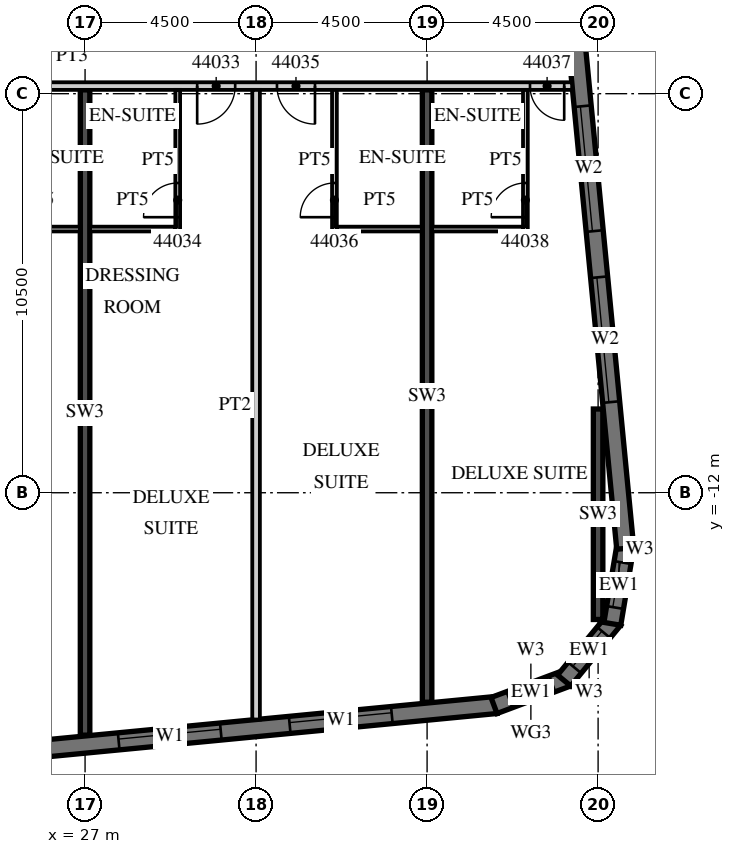
"""IFC4 building model, lengths in metres.
Left out: names, types, materials, properties, quantities, classifications, styles, units other than length and angle.
Written with IfcOpenShell. Run it as: python <this file> out.ifc"""

import sys

from ifc_helpers import new_model, si_unit, direction, frame, frame_2d, origin, place, context, subcontext, project, spatial, polyline, rectangle, outline, extrude, element, fill, save


model = new_model("IFC4")
c1 = context("Model", 3, precision=1e-05, world=origin(), true_north=direction((0.0, 1.0)))
c2 = subcontext(c1, "Body", "Model", "MODEL_VIEW")
j1 = project(units=[si_unit("LENGTHUNIT", "METRE"), si_unit("PLANEANGLEUNIT", "RADIAN")], contexts=[c1])
p1 = place(None, origin())
s1 = spatial("IfcSite", under=j1, at=p1, CompositionType="ELEMENT")
p2 = place(p1, origin())
s2 = spatial("IfcBuilding", under=s1, at=p2, CompositionType="ELEMENT")
p3 = place(p2, frame((0.0, 0.0, 186.7)))
s3 = spatial("IfcBuildingStorey", under=s2, at=p3, CompositionType="ELEMENT", Elevation=186.7)
p4 = place(p3, frame((27.0, -18.379, 0.0), z_axis=(0.0, 0.0, 1.0), x_axis=(0.0, 1.0, 0.0)))
e1 = element("IfcWall", 1, at=p4, inside=s3, PredefinedType="SHEAR", context=c2, shape_type="SweptSolid", body=[
    extrude(rectangle(XDim=16.979, YDim=0.25, at=frame_2d((8.489, 0.0))), origin(), (0.0, 0.0, 1.0), 3.3),
])
p5 = place(p3, frame((36.0, -17.512, 0.0), z_axis=(0.0, 0.0, 1.0), x_axis=(0.0, 1.0, 0.0)))
e2 = element("IfcWall", 2, at=p5, inside=s3, PredefinedType="SHEAR", context=c2, shape_type="SweptSolid", body=[
    extrude(rectangle(XDim=16.112, YDim=0.25, at=frame_2d((8.056, 0.0))), origin(), (0.0, 0.0, 1.0), 3.3),
])
p6 = place(p3, frame((40.5, -15.335, 0.0), z_axis=(0.0, 0.0, 1.0), x_axis=(0.0, 1.0, 0.0)))
e3 = element("IfcWall", 3, at=p6, inside=s3, PredefinedType="SHEAR", context=c2, shape_type="SweptSolid", body=[
    extrude(rectangle(XDim=5.538, YDim=0.25, at=frame_2d((2.769, 0.0))), origin(), (0.0, 0.0, 1.0), 3.3),
])
p7 = place(p3, frame((-13.521, -22.529, 0.0), z_axis=(0.0, 0.0, 1.0), x_axis=(0.995396436651, 0.095843277819, 0.0)))
e4 = element("IfcWall", 4, at=p7, inside=s3, PredefinedType="SOLIDWALL", context=c2, shape_type="SweptSolid", body=[
    extrude(rectangle(XDim=51.578, YDim=0.45, at=frame_2d((25.789, 0.0))), origin(), (0.0, 0.0, 1.0), 3.02),
])
p8 = place(p7, frame((0.91, 0.0, 0.45)))
e5 = element("IfcOpeningElement", 5, at=p8, cuts=e4, PredefinedType="OPENING", context=c2, shape_type="SweptSolid", body=[
    extrude(rectangle(XDim=2.7, YDim=2.25, at=frame_2d((1.35, 1.125))), frame((0.0, 0.235, 0.0), z_axis=(0.0, -1.0, 0.0), x_axis=(1.0, 0.0, 0.0)), (0.0, 0.0, 1.0), 0.47),
])
p9 = place(p7, frame((5.431, 0.0, 0.45)))
e6 = element("IfcOpeningElement", 6, at=p9, cuts=e4, PredefinedType="OPENING", context=c2, shape_type="SweptSolid", body=[
    extrude(rectangle(XDim=2.7, YDim=2.25, at=frame_2d((1.35, 1.125))), frame((0.0, 0.235, 0.0), z_axis=(0.0, -1.0, 0.0), x_axis=(1.0, 0.0, 0.0)), (0.0, 0.0, 1.0), 0.47),
])
p10 = place(p7, frame((9.952, 0.0, 0.45)))
e7 = element("IfcOpeningElement", 7, at=p10, cuts=e4, PredefinedType="OPENING", context=c2, shape_type="SweptSolid", body=[
    extrude(rectangle(XDim=2.7, YDim=2.25, at=frame_2d((1.35, 1.125))), frame((0.0, 0.235, 0.0), z_axis=(0.0, -1.0, 0.0), x_axis=(1.0, 0.0, 0.0)), (0.0, 0.0, 1.0), 0.47),
])
p11 = place(p7, frame((14.473, 0.0, 0.45)))
e8 = element("IfcOpeningElement", 8, at=p11, cuts=e4, PredefinedType="OPENING", context=c2, shape_type="SweptSolid", body=[
    extrude(rectangle(XDim=2.7, YDim=2.25, at=frame_2d((1.35, 1.125))), frame((0.0, 0.235, 0.0), z_axis=(0.0, -1.0, 0.0), x_axis=(1.0, 0.0, 0.0)), (0.0, 0.0, 1.0), 0.47),
])
p12 = place(p7, frame((18.994, 0.0, 0.45)))
e9 = element("IfcOpeningElement", 9, at=p12, cuts=e4, PredefinedType="OPENING", context=c2, shape_type="SweptSolid", body=[
    extrude(rectangle(XDim=2.7, YDim=2.25, at=frame_2d((1.35, 1.125))), frame((0.0, 0.235, 0.0), z_axis=(0.0, -1.0, 0.0), x_axis=(1.0, 0.0, 0.0)), (0.0, 0.0, 1.0), 0.47),
])
p13 = place(p7, frame((23.514, 0.0, 0.45)))
e10 = element("IfcOpeningElement", 10, at=p13, cuts=e4, PredefinedType="OPENING", context=c2, shape_type="SweptSolid", body=[
    extrude(rectangle(XDim=2.7, YDim=2.25, at=frame_2d((1.35, 1.125))), frame((0.0, 0.235, 0.0), z_axis=(0.0, -1.0, 0.0), x_axis=(1.0, 0.0, 0.0)), (0.0, 0.0, 1.0), 0.47),
])
p14 = place(p7, frame((28.035, 0.0, 0.45)))
e11 = element("IfcOpeningElement", 11, at=p14, cuts=e4, PredefinedType="OPENING", context=c2, shape_type="SweptSolid", body=[
    extrude(rectangle(XDim=2.7, YDim=2.25, at=frame_2d((1.35, 1.125))), frame((0.0, 0.235, 0.0), z_axis=(0.0, -1.0, 0.0), x_axis=(1.0, 0.0, 0.0)), (0.0, 0.0, 1.0), 0.47),
])
p15 = place(p7, frame((32.556, 0.0, 0.45)))
e12 = element("IfcOpeningElement", 12, at=p15, cuts=e4, PredefinedType="OPENING", context=c2, shape_type="SweptSolid", body=[
    extrude(rectangle(XDim=2.7, YDim=2.25, at=frame_2d((1.35, 1.125))), frame((0.0, 0.235, 0.0), z_axis=(0.0, -1.0, 0.0), x_axis=(1.0, 0.0, 0.0)), (0.0, 0.0, 1.0), 0.47),
])
p16 = place(p7, frame((37.077, 0.0, 0.45)))
e13 = element("IfcOpeningElement", 13, at=p16, cuts=e4, PredefinedType="OPENING", context=c2, shape_type="SweptSolid", body=[
    extrude(rectangle(XDim=2.7, YDim=2.25, at=frame_2d((1.35, 1.125))), frame((0.0, 0.235, 0.0), z_axis=(0.0, -1.0, 0.0), x_axis=(1.0, 0.0, 0.0)), (0.0, 0.0, 1.0), 0.47),
])
p17 = place(p7, frame((41.598, 0.0, 0.45)))
e14 = element("IfcOpeningElement", 14, at=p17, cuts=e4, PredefinedType="OPENING", context=c2, shape_type="SweptSolid", body=[
    extrude(rectangle(XDim=2.7, YDim=2.25, at=frame_2d((1.35, 1.125))), frame((0.0, 0.235, 0.0), z_axis=(0.0, -1.0, 0.0), x_axis=(1.0, 0.0, 0.0)), (0.0, 0.0, 1.0), 0.47),
])
p18 = place(p7, frame((46.119, 0.0, 0.45)))
e15 = element("IfcOpeningElement", 15, at=p18, cuts=e4, PredefinedType="OPENING", context=c2, shape_type="SweptSolid", body=[
    extrude(rectangle(XDim=2.7, YDim=2.25, at=frame_2d((1.35, 1.125))), frame((0.0, 0.235, 0.0), z_axis=(0.0, -1.0, 0.0), x_axis=(1.0, 0.0, 0.0)), (0.0, 0.0, 1.0), 0.47),
])
p19 = place(p3, frame((37.761, -17.598, 0.0), z_axis=(0.0, 0.0, 1.0), x_axis=(0.936677599948, 0.350192909346, 0.0)))
e16 = element("IfcWall", 16, at=p19, inside=s3, PredefinedType="SOLIDWALL", context=c2, shape_type="SweptSolid", body=[
    extrude(outline(polyline([(0.0, -0.225), (2.071, -0.225), (1.95, 0.225), (0.121, 0.225), (0.0, -0.225)])), origin(), (0.0, 0.0, 1.0), 3.02),
])
p20 = place(p19, frame((0.435, 0.0, 0.45)))
e17 = element("IfcOpeningElement", 17, at=p20, cuts=e16, PredefinedType="OPENING", context=c2, shape_type="SweptSolid", body=[
    extrude(rectangle(XDim=1.2, YDim=2.25, at=frame_2d((0.6, 1.125))), frame((0.0, 0.235, 0.0), z_axis=(0.0, -1.0, 0.0), x_axis=(1.0, 0.0, 0.0)), (0.0, 0.0, 1.0), 0.47),
])
p21 = place(p3, frame((39.606, -16.941, 0.0), z_axis=(0.0, 0.0, 1.0), x_axis=(0.636116318187, 0.771593176315, 0.0)))
e18 = element("IfcWall", 18, at=p21, inside=s3, PredefinedType="SOLIDWALL", context=c2, shape_type="SweptSolid", body=[
    extrude(outline(polyline([(0.0, -0.225), (2.071, -0.225), (1.95, 0.225), (0.121, 0.225), (0.0, -0.225)])), origin(), (0.0, 0.0, 1.0), 3.02),
])
p22 = place(p21, frame((0.435, 0.0, 0.45)))
e19 = element("IfcOpeningElement", 19, at=p22, cuts=e18, PredefinedType="OPENING", context=c2, shape_type="SweptSolid", body=[
    extrude(rectangle(XDim=1.2, YDim=2.25, at=frame_2d((0.6, 1.125))), frame((0.0, 0.235, 0.0), z_axis=(0.0, -1.0, 0.0), x_axis=(1.0, 0.0, 0.0)), (0.0, 0.0, 1.0), 0.47),
])
p23 = place(p3, frame((40.875, -15.449, 0.0), z_axis=(0.0, 0.0, 1.0), x_axis=(0.164953448126, 0.986301353518, 0.0)))
e20 = element("IfcWall", 20, at=p23, inside=s3, PredefinedType="SOLIDWALL", context=c2, shape_type="SweptSolid", body=[
    extrude(outline(polyline([(0.0, -0.225), (2.071, -0.225), (1.95, 0.225), (0.121, 0.225), (0.0, -0.225)])), origin(), (0.0, 0.0, 1.0), 3.02),
])
p24 = place(p23, frame((0.435, 0.0, 0.45)))
e21 = element("IfcOpeningElement", 21, at=p24, cuts=e20, PredefinedType="OPENING", context=c2, shape_type="SweptSolid", body=[
    extrude(rectangle(XDim=1.2, YDim=2.25, at=frame_2d((0.6, 1.125))), frame((0.0, 0.235, 0.0), z_axis=(0.0, -1.0, 0.0), x_axis=(1.0, 0.0, 0.0)), (0.0, 0.0, 1.0), 0.47),
])
p25 = place(p3, frame((41.214, -13.466, 0.0), z_axis=(0.0, 0.0, 1.0), x_axis=(-0.095847314626, 0.995396047952, 0.0)))
e22 = element("IfcWall", 22, at=p25, inside=s3, PredefinedType="SOLIDWALL", context=c2, shape_type="SweptSolid", body=[
    extrude(rectangle(XDim=34.0, YDim=0.45, at=frame_2d((17.0, 0.0))), origin(), (0.0, 0.0, 1.0), 3.02),
])
p26 = place(p25, frame((3.869, 0.0, 0.45)))
e23 = element("IfcOpeningElement", 23, at=p26, cuts=e22, PredefinedType="OPENING", context=c2, shape_type="SweptSolid", body=[
    extrude(rectangle(XDim=3.3, YDim=2.25, at=frame_2d((1.65, 1.125))), frame((0.0, 0.235, 0.0), z_axis=(0.0, -1.0, 0.0), x_axis=(1.0, 0.0, 0.0)), (0.0, 0.0, 1.0), 0.47),
])
p27 = place(p25, frame((8.39, 0.0, 0.45)))
e24 = element("IfcOpeningElement", 24, at=p27, cuts=e22, PredefinedType="OPENING", context=c2, shape_type="SweptSolid", body=[
    extrude(rectangle(XDim=3.3, YDim=2.25, at=frame_2d((1.65, 1.125))), frame((0.0, 0.235, 0.0), z_axis=(0.0, -1.0, 0.0), x_axis=(1.0, 0.0, 0.0)), (0.0, 0.0, 1.0), 0.47),
])
p28 = place(p3, frame((13.5, -1.3, 0.0), z_axis=(0.0, 0.0, 1.0), x_axis=(1.0, 0.0, 0.0)))
e25 = element("IfcWall", 25, at=p28, inside=s3, PredefinedType="PARTITIONING", context=c2, shape_type="SweptSolid", body=[
    extrude(rectangle(XDim=26.317, YDim=0.2, at=frame_2d((13.158, 0.0))), origin(), (0.0, 0.0, 1.0), 3.02),
])
p29 = place(p28, frame((0.575, 0.0, 0.0)))
e26 = element("IfcOpeningElement", 26, at=p29, cuts=e25, PredefinedType="OPENING", context=c2, shape_type="SweptSolid", body=[
    extrude(rectangle(XDim=1.0, YDim=2.1, at=frame_2d((0.5, 1.05))), frame((0.0, 0.11, 0.0), z_axis=(0.0, -1.0, 0.0), x_axis=(1.0, 0.0, 0.0)), (0.0, 0.0, 1.0), 0.22),
])
p30 = place(p28, frame((5.075, 0.0, 0.0)))
e27 = element("IfcOpeningElement", 27, at=p30, cuts=e25, PredefinedType="OPENING", context=c2, shape_type="SweptSolid", body=[
    extrude(rectangle(XDim=1.0, YDim=2.1, at=frame_2d((0.5, 1.05))), frame((0.0, 0.11, 0.0), z_axis=(0.0, -1.0, 0.0), x_axis=(1.0, 0.0, 0.0)), (0.0, 0.0, 1.0), 0.22),
])
p31 = place(p28, frame((9.55, 0.0, 0.0)))
e28 = element("IfcOpeningElement", 28, at=p31, cuts=e25, PredefinedType="OPENING", context=c2, shape_type="SweptSolid", body=[
    extrude(rectangle(XDim=1.0, YDim=2.1, at=frame_2d((0.5, 1.05))), frame((0.0, 0.11, 0.0), z_axis=(0.0, -1.0, 0.0), x_axis=(1.0, 0.0, 0.0)), (0.0, 0.0, 1.0), 0.22),
])
p32 = place(p28, frame((16.45, 0.0, 0.0)))
e29 = element("IfcOpeningElement", 29, at=p32, cuts=e25, PredefinedType="OPENING", context=c2, shape_type="SweptSolid", body=[
    extrude(rectangle(XDim=1.0, YDim=2.1, at=frame_2d((0.5, 1.05))), frame((0.0, 0.11, 0.0), z_axis=(0.0, -1.0, 0.0), x_axis=(1.0, 0.0, 0.0)), (0.0, 0.0, 1.0), 0.22),
])
p33 = place(p28, frame((18.55, 0.0, 0.0)))
e30 = element("IfcOpeningElement", 30, at=p33, cuts=e25, PredefinedType="OPENING", context=c2, shape_type="SweptSolid", body=[
    extrude(rectangle(XDim=1.0, YDim=2.1, at=frame_2d((0.5, 1.05))), frame((0.0, 0.11, 0.0), z_axis=(0.0, -1.0, 0.0), x_axis=(1.0, 0.0, 0.0)), (0.0, 0.0, 1.0), 0.22),
])
p34 = place(p28, frame((25.208, 0.0, 0.0)))
e31 = element("IfcOpeningElement", 31, at=p34, cuts=e25, PredefinedType="OPENING", context=c2, shape_type="SweptSolid", body=[
    extrude(rectangle(XDim=0.9, YDim=2.1, at=frame_2d((0.45, 1.05))), frame((0.0, 0.11, 0.0), z_axis=(0.0, -1.0, 0.0), x_axis=(1.0, 0.0, 0.0)), (0.0, 0.0, 1.0), 0.22),
])
p35 = place(p3, frame((24.625, -5.062, 0.0), z_axis=(0.0, 0.0, 1.0), x_axis=(1.0, 0.0, 0.0)))
e32 = element("IfcWall", 32, at=p35, inside=s3, PredefinedType="PARTITIONING", context=c2, shape_type="SweptSolid", body=[
    extrude(rectangle(XDim=2.25, YDim=0.125, at=frame_2d((1.125, 0.0))), origin(), (0.0, 0.0, 1.0), 3.02),
])
p36 = place(p3, frame((31.5, -17.967, 0.0), z_axis=(0.0, 0.0, 1.0), x_axis=(0.0, 1.0, 0.0)))
e33 = element("IfcWall", 33, at=p36, inside=s3, PredefinedType="PARTITIONING", context=c2, shape_type="SweptSolid", body=[
    extrude(rectangle(XDim=16.567, YDim=0.2, at=frame_2d((8.284, 0.0))), origin(), (0.0, 0.0, 1.0), 3.02),
])
p37 = place(p3, frame((29.438, -5.125, 0.0), z_axis=(0.0, 0.0, 1.0), x_axis=(0.0, 1.0, 0.0)))
e34 = element("IfcWall", 34, at=p37, inside=s3, PredefinedType="PARTITIONING", context=c2, shape_type="SweptSolid", body=[
    extrude(rectangle(XDim=3.725, YDim=0.125, at=frame_2d((1.863, 0.0))), origin(), (0.0, 0.0, 1.0), 3.02),
])
p38 = place(p37, frame((0.375, 0.0, 0.0)))
e35 = element("IfcOpeningElement", 35, at=p38, cuts=e34, PredefinedType="OPENING", context=c2, shape_type="SweptSolid", body=[
    extrude(rectangle(XDim=0.9, YDim=2.1, at=frame_2d((0.45, 1.05))), frame((0.0, 0.073, 0.0), z_axis=(0.0, -1.0, 0.0), x_axis=(1.0, 0.0, 0.0)), (0.0, 0.0, 1.0), 0.145),
])
p39 = place(p3, frame((27.125, -5.062, 0.0), z_axis=(0.0, 0.0, 1.0), x_axis=(1.0, 0.0, 0.0)))
e36 = element("IfcWall", 36, at=p39, inside=s3, PredefinedType="PARTITIONING", context=c2, shape_type="SweptSolid", body=[
    extrude(rectangle(XDim=2.25, YDim=0.125, at=frame_2d((1.125, 0.0))), origin(), (0.0, 0.0, 1.0), 3.02),
])
p40 = place(p3, frame((33.562, -5.125, 0.0), z_axis=(0.0, 0.0, 1.0), x_axis=(0.0, 1.0, 0.0)))
e37 = element("IfcWall", 37, at=p40, inside=s3, PredefinedType="PARTITIONING", context=c2, shape_type="SweptSolid", body=[
    extrude(rectangle(XDim=3.725, YDim=0.125, at=frame_2d((1.863, 0.0))), origin(), (0.0, 0.0, 1.0), 3.02),
])
p41 = place(p40, frame((0.375, 0.0, 0.0)))
e38 = element("IfcOpeningElement", 38, at=p41, cuts=e37, PredefinedType="OPENING", context=c2, shape_type="SweptSolid", body=[
    extrude(rectangle(XDim=0.9, YDim=2.1, at=frame_2d((0.45, 1.05))), frame((0.0, 0.073, 0.0), z_axis=(0.0, -1.0, 0.0), x_axis=(1.0, 0.0, 0.0)), (0.0, 0.0, 1.0), 0.145),
])
p42 = place(p3, frame((33.625, -5.062, 0.0), z_axis=(0.0, 0.0, 1.0), x_axis=(1.0, 0.0, 0.0)))
e39 = element("IfcWall", 39, at=p42, inside=s3, PredefinedType="PARTITIONING", context=c2, shape_type="SweptSolid", body=[
    extrude(rectangle(XDim=2.25, YDim=0.125, at=frame_2d((1.125, 0.0))), origin(), (0.0, 0.0, 1.0), 3.02),
])
p43 = place(p3, frame((38.587, -5.125, 0.0), z_axis=(0.0, 0.0, 1.0), x_axis=(0.0, 1.0, 0.0)))
e40 = element("IfcWall", 40, at=p43, inside=s3, PredefinedType="PARTITIONING", context=c2, shape_type="SweptSolid", body=[
    extrude(rectangle(XDim=3.725, YDim=0.125, at=frame_2d((1.863, 0.0))), origin(), (0.0, 0.0, 1.0), 3.02),
])
p44 = place(p43, frame((0.375, 0.0, 0.0)))
e41 = element("IfcOpeningElement", 41, at=p44, cuts=e40, PredefinedType="OPENING", context=c2, shape_type="SweptSolid", body=[
    extrude(rectangle(XDim=0.9, YDim=2.1, at=frame_2d((0.45, 1.05))), frame((0.0, 0.073, 0.0), z_axis=(0.0, -1.0, 0.0), x_axis=(1.0, 0.0, 0.0)), (0.0, 0.0, 1.0), 0.145),
])
p45 = place(p3, frame((36.125, -5.062, 0.0), z_axis=(0.0, 0.0, 1.0), x_axis=(1.0, 0.0, 0.0)))
e42 = element("IfcWall", 42, at=p45, inside=s3, PredefinedType="PARTITIONING", context=c2, shape_type="SweptSolid", body=[
    extrude(rectangle(XDim=2.4, YDim=0.125, at=frame_2d((1.2, 0.0))), origin(), (0.0, 0.0, 1.0), 3.02),
])
p46 = place(p17, origin())
e43 = element("IfcWindow", 43, at=p46, inside=s3, PartitioningType="SINGLE_PANEL", PredefinedType="WINDOW", context=c2, shape_type="SweptSolid", body=[
    extrude(rectangle(XDim=2.7, YDim=2.25, at=frame_2d((1.35, 1.125))), frame((0.0, 0.09, 0.0), z_axis=(0.0, -1.0, 0.0), x_axis=(1.0, 0.0, 0.0)), (0.0, 0.0, 1.0), 0.06),
])
fill(e14, e43)
p47 = place(p18, origin())
e44 = element("IfcWindow", 44, at=p47, inside=s3, PartitioningType="SINGLE_PANEL", PredefinedType="WINDOW", context=c2, shape_type="SweptSolid", body=[
    extrude(rectangle(XDim=2.7, YDim=2.25, at=frame_2d((1.35, 1.125))), frame((0.0, 0.09, 0.0), z_axis=(0.0, -1.0, 0.0), x_axis=(1.0, 0.0, 0.0)), (0.0, 0.0, 1.0), 0.06),
])
fill(e15, e44)
p48 = place(p20, origin())
e45 = element("IfcWindow", 45, at=p48, inside=s3, PartitioningType="SINGLE_PANEL", PredefinedType="WINDOW", context=c2, shape_type="SweptSolid", body=[
    extrude(rectangle(XDim=1.2, YDim=2.25, at=frame_2d((0.6, 1.125))), frame((0.0, 0.09, 0.0), z_axis=(0.0, -1.0, 0.0), x_axis=(1.0, 0.0, 0.0)), (0.0, 0.0, 1.0), 0.06),
])
fill(e17, e45)
p49 = place(p22, origin())
e46 = element("IfcWindow", 46, at=p49, inside=s3, PartitioningType="SINGLE_PANEL", PredefinedType="WINDOW", context=c2, shape_type="SweptSolid", body=[
    extrude(rectangle(XDim=1.2, YDim=2.25, at=frame_2d((0.6, 1.125))), frame((0.0, 0.09, 0.0), z_axis=(0.0, -1.0, 0.0), x_axis=(1.0, 0.0, 0.0)), (0.0, 0.0, 1.0), 0.06),
])
fill(e19, e46)
p50 = place(p24, origin())
e47 = element("IfcWindow", 47, at=p50, inside=s3, PartitioningType="SINGLE_PANEL", PredefinedType="WINDOW", context=c2, shape_type="SweptSolid", body=[
    extrude(rectangle(XDim=1.2, YDim=2.25, at=frame_2d((0.6, 1.125))), frame((0.0, 0.09, 0.0), z_axis=(0.0, -1.0, 0.0), x_axis=(1.0, 0.0, 0.0)), (0.0, 0.0, 1.0), 0.06),
])
fill(e21, e47)
p51 = place(p26, origin())
e48 = element("IfcWindow", 48, at=p51, inside=s3, PartitioningType="SINGLE_PANEL", PredefinedType="WINDOW", context=c2, shape_type="SweptSolid", body=[
    extrude(rectangle(XDim=3.3, YDim=2.25, at=frame_2d((1.65, 1.125))), frame((0.0, 0.09, 0.0), z_axis=(0.0, -1.0, 0.0), x_axis=(1.0, 0.0, 0.0)), (0.0, 0.0, 1.0), 0.06),
])
fill(e23, e48)
p52 = place(p27, origin())
e49 = element("IfcWindow", 49, at=p52, inside=s3, PartitioningType="SINGLE_PANEL", PredefinedType="WINDOW", context=c2, shape_type="SweptSolid", body=[
    extrude(rectangle(XDim=3.3, YDim=2.25, at=frame_2d((1.65, 1.125))), frame((0.0, 0.09, 0.0), z_axis=(0.0, -1.0, 0.0), x_axis=(1.0, 0.0, 0.0)), (0.0, 0.0, 1.0), 0.06),
])
fill(e24, e49)
p53 = place(p32, origin())
e50 = element("IfcDoor", 50, at=p53, inside=s3, OperationType="SINGLE_SWING_LEFT", PredefinedType="DOOR", context=c2, shape_type="SweptSolid", body=[
    extrude(rectangle(XDim=1.0, YDim=2.1, at=frame_2d((0.5, 1.05))), frame((0.0, 0.025, 0.0), z_axis=(0.0, -1.0, 0.0), x_axis=(1.0, 0.0, 0.0)), (0.0, 0.0, 1.0), 0.05),
])
fill(e29, e50)
p54 = place(p38, origin())
e51 = element("IfcDoor", 51, at=p54, inside=s3, OperationType="SINGLE_SWING_LEFT", PredefinedType="DOOR", context=c2, shape_type="SweptSolid", body=[
    extrude(rectangle(XDim=0.9, YDim=2.1, at=frame_2d((0.45, 1.05))), frame((0.0, 0.025, 0.0), z_axis=(0.0, -1.0, 0.0), x_axis=(1.0, 0.0, 0.0)), (0.0, 0.0, 1.0), 0.05),
])
fill(e35, e51)
p55 = place(p33, origin())
e52 = element("IfcDoor", 52, at=p55, inside=s3, OperationType="SINGLE_SWING_RIGHT", PredefinedType="DOOR", context=c2, shape_type="SweptSolid", body=[
    extrude(rectangle(XDim=1.0, YDim=2.1, at=frame_2d((0.5, 1.05))), frame((0.0, 0.025, 0.0), z_axis=(0.0, -1.0, 0.0), x_axis=(1.0, 0.0, 0.0)), (0.0, 0.0, 1.0), 0.05),
])
fill(e30, e52)
p56 = place(p41, origin())
e53 = element("IfcDoor", 53, at=p56, inside=s3, OperationType="SINGLE_SWING_LEFT", PredefinedType="DOOR", context=c2, shape_type="SweptSolid", body=[
    extrude(rectangle(XDim=0.9, YDim=2.1, at=frame_2d((0.45, 1.05))), frame((0.0, 0.025, 0.0), z_axis=(0.0, -1.0, 0.0), x_axis=(1.0, 0.0, 0.0)), (0.0, 0.0, 1.0), 0.05),
])
fill(e38, e53)
p57 = place(p34, origin())
e54 = element("IfcDoor", 54, at=p57, inside=s3, OperationType="SINGLE_SWING_RIGHT", PredefinedType="DOOR", context=c2, shape_type="SweptSolid", body=[
    extrude(rectangle(XDim=0.9, YDim=2.1, at=frame_2d((0.45, 1.05))), frame((0.0, 0.025, 0.0), z_axis=(0.0, -1.0, 0.0), x_axis=(1.0, 0.0, 0.0)), (0.0, 0.0, 1.0), 0.05),
])
fill(e31, e54)
p58 = place(p44, origin())
e55 = element("IfcDoor", 55, at=p58, inside=s3, OperationType="SINGLE_SWING_LEFT", PredefinedType="DOOR", context=c2, shape_type="SweptSolid", body=[
    extrude(rectangle(XDim=0.9, YDim=2.1, at=frame_2d((0.45, 1.05))), frame((0.0, 0.025, 0.0), z_axis=(0.0, -1.0, 0.0), x_axis=(1.0, 0.0, 0.0)), (0.0, 0.0, 1.0), 0.05),
])
fill(e41, e55)
save(model, sys.argv[1])
